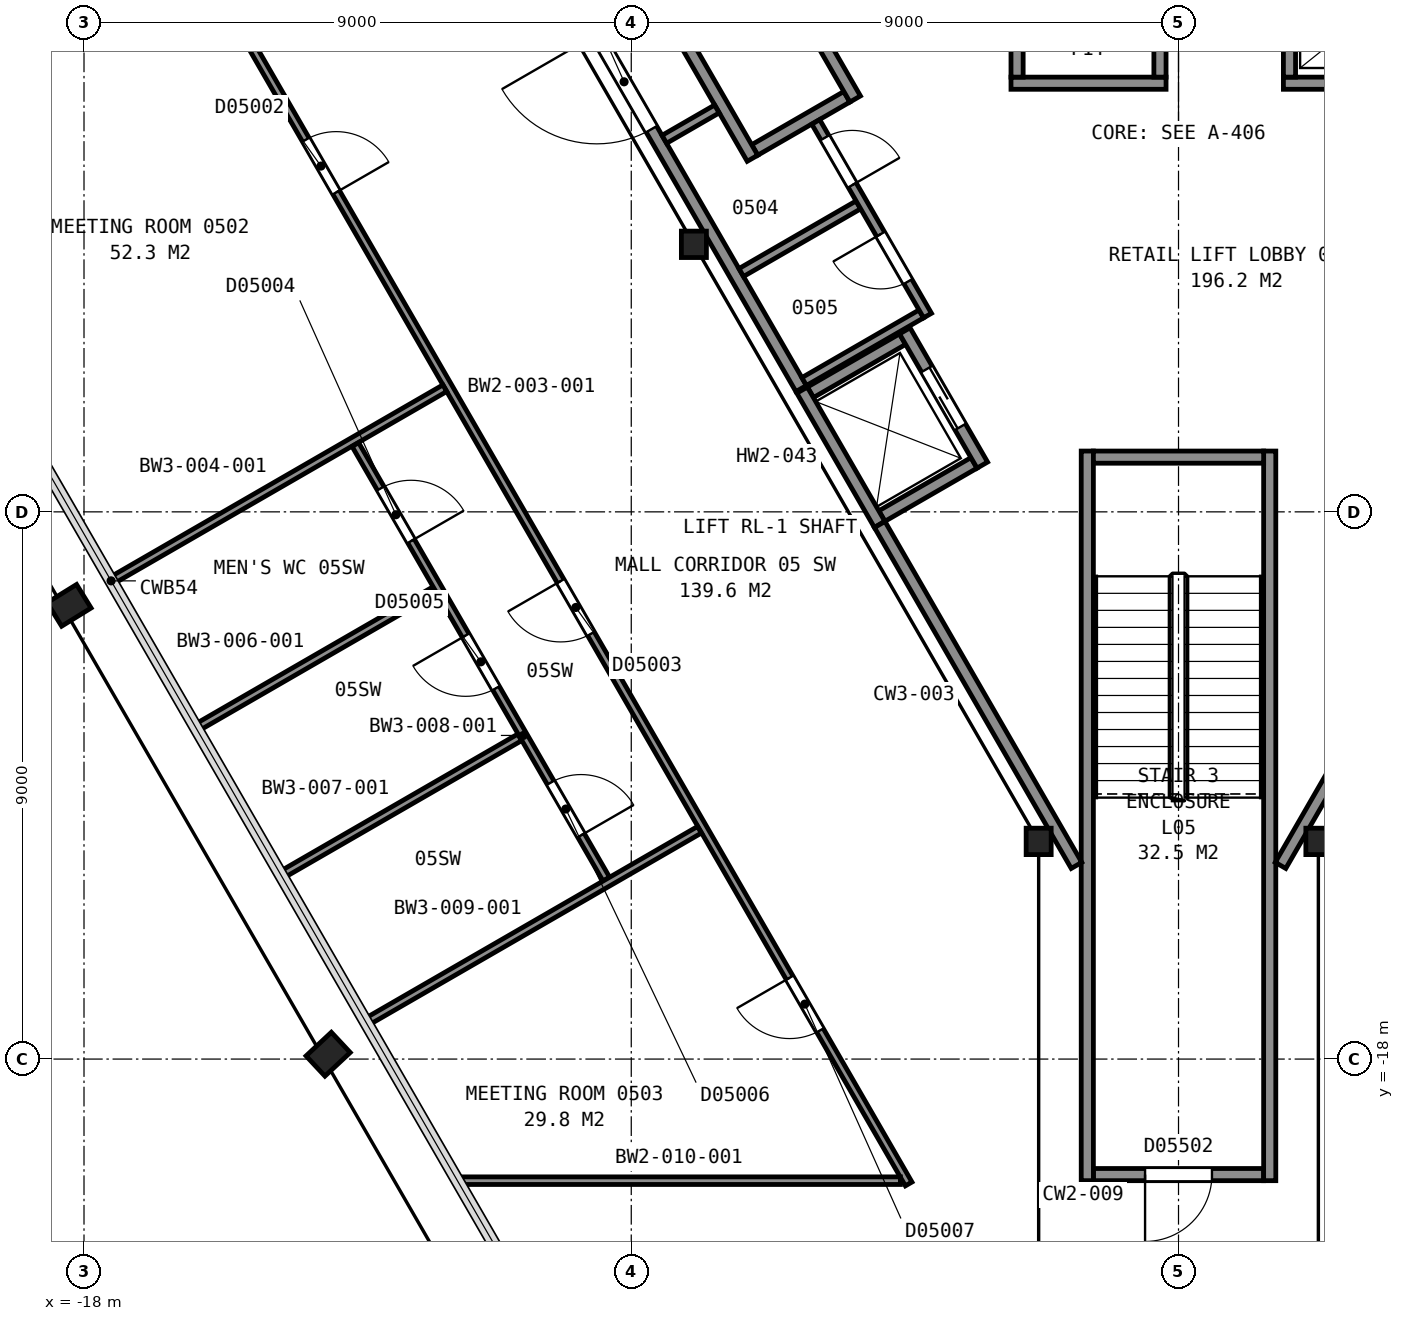
"""IFC4 building model, lengths in metres.
Left out: names, types, materials, properties, quantities, classifications, styles, units other than length and angle.
Written with IfcOpenShell. Run it as: python <this file> out.ifc"""

import sys

from ifc_helpers import new_model, si_unit, direction, frame, frame_2d, origin, origin_2d, place, context, subcontext, project, spatial, rectangle, i_section, extrude, element, fill, save


model = new_model("IFC4")
c1 = context("Model", 3, precision=1e-05, world=origin(), true_north=direction((0.0, 1.0)))
c2 = subcontext(c1, "Body", "Model", "MODEL_VIEW")
j1 = project(units=[si_unit("LENGTHUNIT", "METRE"), si_unit("PLANEANGLEUNIT", "RADIAN")], contexts=[c1])
p1 = place(None, origin())
s1 = spatial("IfcSite", under=j1, at=p1, CompositionType="ELEMENT")
p2 = place(p1, origin())
s2 = spatial("IfcBuilding", under=s1, at=p2, CompositionType="ELEMENT")
p3 = place(p2, frame((0.0, 0.0, 32.0)))
s3 = spatial("IfcBuildingStorey", under=s2, at=p3, CompositionType="ELEMENT", Elevation=32.0)
p4 = place(p3, frame((-18.328, -10.589, 0.025), z_axis=(0.070582350376, 0.043588955131, 0.996553126936), x_axis=(-0.499945117104, 0.866053561357, -0.002471587651)))
e1 = element("IfcColumn", 1, at=p4, inside=s3, PredefinedType="COLUMN", context=c2, shape_type="SweptSolid", body=[
    extrude(i_section(OverallWidth=0.455, OverallDepth=0.569, WebThickness=0.078, FlangeThickness=0.125, FilletRadius=0.015, at=origin_2d()), origin(), (0.0, 0.0, 1.0), 4.766),
])
p5 = place(p3, frame((-14.058, -17.989, 0.025), z_axis=(0.062221812166, 0.058124902723, 0.996368376543), x_axis=(-0.500286642151, 0.865645685463, -0.019256763096)))
e2 = element("IfcColumn", 2, at=p5, inside=s3, PredefinedType="COLUMN", context=c2, shape_type="SweptSolid", body=[
    extrude(i_section(OverallWidth=0.455, OverallDepth=0.569, WebThickness=0.078, FlangeThickness=0.125, FilletRadius=0.015, at=origin_2d()), origin(), (0.0, 0.0, 1.0), 4.767),
])
for number, where, z_axis, x_axis in (
    (3, (-7.97, -4.6, 0.0), (0.0, 0.0, 1.0), (1.0, 0.0, 0.0)),
    (4, (-2.3, -14.42, 0.0), (0.0, 0.0, 1.0), (1.0, 0.0, 0.0)),
    (5, (2.3, -14.42, 0.0), (0.0, 0.0, 1.0), (1.0, 0.0, 0.0)),
):
    element("IfcColumn", number, at=place(p3, frame(where, z_axis=z_axis, x_axis=x_axis)), inside=s3, PredefinedType="COLUMN", context=c2, shape_type="SweptSolid", body=[
        extrude(i_section(OverallWidth=0.411, OverallDepth=0.434, WebThickness=0.036, FlangeThickness=0.057, FilletRadius=0.015, at=origin_2d()), origin(), (0.0, 0.0, 1.0), 4.8),
    ])
p6 = place(p3, frame((-1.4, -19.9, 0.0), z_axis=(0.0, 0.0, 1.0), x_axis=(1.0, 0.0, 0.0)))
e6 = element("IfcWall", 6, at=p6, inside=s3, PredefinedType="PARTITIONING", context=c2, shape_type="SweptSolid", body=[
    extrude(rectangle(XDim=2.8, YDim=0.2, at=frame_2d((1.4, 0.0))), origin(), (0.0, 0.0, 1.0), 4.55),
])
p7 = place(p6, frame((0.85, 0.0, 0.0)))
e7 = element("IfcOpeningElement", 7, at=p7, cuts=e6, PredefinedType="OPENING", context=c2, shape_type="SweptSolid", body=[
    extrude(rectangle(XDim=1.1, YDim=2.1, at=frame_2d((0.55, 1.05))), frame((0.0, 0.11, 0.0), z_axis=(0.0, -1.0, 0.0), x_axis=(1.0, 0.0, 0.0)), (0.0, 0.0, 1.0), 0.22),
])
for number, where, z_axis, x_axis in (
    (8, (1.5, -8.0, 0.0), (0.0, 0.0, 1.0), (0.0, -1.0, 0.0)),
    (9, (-1.5, -8.0, 0.0), (0.0, 0.0, 1.0), (0.0, -1.0, 0.0)),
):
    element("IfcWall", number, at=place(p3, frame(where, z_axis=z_axis, x_axis=x_axis)), inside=s3, PredefinedType="PARTITIONING", context=c2, shape_type="SweptSolid", body=[
        extrude(rectangle(XDim=12.0, YDim=0.2, at=frame_2d((6.0, 0.0))), origin(), (0.0, 0.0, 1.0), 4.55),
    ])
p8 = place(p3, frame((-1.4, -8.1, 0.0), z_axis=(0.0, 0.0, 1.0), x_axis=(1.0, 0.0, 0.0)))
e10 = element("IfcWall", 10, at=p8, inside=s3, PredefinedType="PARTITIONING", context=c2, shape_type="SweptSolid", body=[
    extrude(rectangle(XDim=2.8, YDim=0.2, at=frame_2d((1.4, 0.0))), origin(), (0.0, 0.0, 1.0), 4.55),
])
p9 = place(p3, frame((-2.755, -1.95, 0.0), z_axis=(0.0, 0.0, 1.0), x_axis=(1.0, 0.0, 0.0)))
e11 = element("IfcWall", 11, at=p9, inside=s3, PredefinedType="PARTITIONING", context=c2, shape_type="SweptSolid", body=[
    extrude(rectangle(XDim=2.55, YDim=0.2, at=frame_2d((1.275, 0.0))), origin(), (0.0, 0.0, 1.0), 4.8),
])
p10 = place(p3, frame((1.725, -1.95, 0.0), z_axis=(0.0, 0.0, 1.0), x_axis=(1.0, 0.0, 0.0)))
e12 = element("IfcWall", 12, at=p10, inside=s3, PredefinedType="PARTITIONING", context=c2, shape_type="SweptSolid", body=[
    extrude(rectangle(XDim=2.55, YDim=0.2, at=frame_2d((1.275, 0.0))), origin(), (0.0, 0.0, 1.0), 4.55),
])
p11 = place(p10, frame((0.725, 0.0, 0.0)))
e13 = element("IfcOpeningElement", 13, at=p11, cuts=e12, PredefinedType="OPENING", context=c2, shape_type="SweptSolid", body=[
    extrude(rectangle(XDim=1.1, YDim=2.1, at=frame_2d((0.55, 1.05))), frame((0.0, 0.11, 0.0), z_axis=(0.0, -1.0, 0.0), x_axis=(1.0, 0.0, 0.0)), (0.0, 0.0, 1.0), 0.22),
])
for number, where, z_axis, x_axis in (
    (14, (-4.879, -9.07, 0.0), (0.0, 0.0, 1.0), (0.866, 0.5, 0.0)),
    (15, (-6.054, -7.034, 0.0), (0.0, 0.0, 1.0), (0.866, 0.5, 0.0)),
):
    element("IfcWall", number, at=place(p3, frame(where, z_axis=z_axis, x_axis=x_axis)), inside=s3, PredefinedType="PARTITIONING", context=c2, shape_type="SweptSolid", body=[
        extrude(rectangle(XDim=1.75, YDim=0.2, at=frame_2d((0.875, 0.0))), origin(), (0.0, 0.0, 1.0), 4.55),
    ])
p12 = place(p3, frame((-6.97, -3.048, 0.0), z_axis=(0.0, 0.0, 1.0), x_axis=(0.866036909293, 0.499980071345, 0.0)))
e16 = element("IfcWall", 16, at=p12, inside=s3, PredefinedType="PARTITIONING", context=c2, shape_type="SweptSolid", body=[
    extrude(rectangle(XDim=1.75, YDim=0.2, at=frame_2d((0.875, 0.0))), origin(), (0.0, 0.0, 1.0), 4.8),
])
p13 = place(p3, frame((1.825, -1.85, 0.0), z_axis=(0.0, 0.0, 1.0), x_axis=(0.0, 1.0, 0.0)))
e17 = element("IfcWall", 17, at=p13, inside=s3, PredefinedType="PARTITIONING", context=c2, shape_type="SweptSolid", body=[
    extrude(rectangle(XDim=1.75, YDim=0.2, at=frame_2d((0.875, 0.0))), origin(), (0.0, 0.0, 1.0), 4.55),
])
for number, where, z_axis, x_axis in (
    (18, (-0.305, -1.85, 0.0), (0.0, 0.0, 1.0), (0.0, 1.0, 0.0)),
    (19, (-2.655, -1.85, 0.0), (0.0, 0.0, 1.0), (0.0, 1.0, 0.0)),
):
    element("IfcWall", number, at=place(p3, frame(where, z_axis=z_axis, x_axis=x_axis)), inside=s3, PredefinedType="PARTITIONING", context=c2, shape_type="SweptSolid", body=[
        extrude(rectangle(XDim=1.75, YDim=0.2, at=frame_2d((0.875, 0.0))), origin(), (0.0, 0.0, 1.0), 4.8),
    ])
p14 = place(p3, frame((-5.318, -2.21, 0.0), z_axis=(0.0, 0.0, 1.0), x_axis=(-0.499938297808, 0.866061024631, 0.0)))
e20 = element("IfcWall", 20, at=p14, inside=s3, PredefinedType="PARTITIONING", context=c2, shape_type="SweptSolid", body=[
    extrude(rectangle(XDim=2.35, YDim=0.2, at=frame_2d((1.175, 0.0))), origin(), (0.0, 0.0, 1.0), 4.8),
])
p15 = place(p3, frame((-3.227, -8.231, 0.0), z_axis=(0.0, 0.0, 1.0), x_axis=(-0.499948979701, 0.866054858364, 0.0)))
e21 = element("IfcWall", 21, at=p15, inside=s3, PredefinedType="PARTITIONING", context=c2, shape_type="SweptSolid", body=[
    extrude(rectangle(XDim=2.55, YDim=0.2, at=frame_2d((1.275, 0.0))), origin(), (0.0, 0.0, 1.0), 4.55),
])
p16 = place(p15, frame((0.725, 0.0, 0.0)))
e22 = element("IfcOpeningElement", 22, at=p16, cuts=e21, PredefinedType="OPENING", context=c2, shape_type="SweptSolid", body=[
    extrude(rectangle(XDim=1.1, YDim=2.1, at=frame_2d((0.55, 1.05))), frame((0.0, 0.11, 0.0), z_axis=(0.0, -1.0, 0.0), x_axis=(1.0, 0.0, 0.0)), (0.0, 0.0, 1.0), 0.22),
])
p17 = place(p3, frame((-7.006, -3.185, 0.0), z_axis=(0.0, 0.0, 1.0), x_axis=(-0.499990435942, 0.866030925526, 0.0)))
e23 = element("IfcWall", 23, at=p17, inside=s3, PredefinedType="PARTITIONING", context=c2, shape_type="SweptSolid", body=[
    extrude(rectangle(XDim=2.55, YDim=0.2, at=frame_2d((1.275, 0.0))), origin(), (0.0, 0.0, 1.0), 4.8),
])
p18 = place(p3, frame((-4.916, -9.206, 0.0), z_axis=(0.0, 0.0, 1.0), x_axis=(-0.499990435942, 0.866030925526, 0.0)))
e24 = element("IfcWall", 24, at=p18, inside=s3, PredefinedType="PARTITIONING", context=c2, shape_type="SweptSolid", body=[
    extrude(rectangle(XDim=2.55, YDim=0.2, at=frame_2d((1.275, 0.0))), origin(), (0.0, 0.0, 1.0), 4.55),
])
p19 = place(p3, frame((-13.666, 5.95, 0.0), z_axis=(0.0, 0.0, 1.0), x_axis=(0.499985890914, -0.866033549516, 0.0)))
e25 = element("IfcWall", 25, at=p19, inside=s3, PredefinedType="PARTITIONING", context=c2, shape_type="SweptSolid", body=[
    extrude(rectangle(XDim=14.921, YDim=0.2, at=frame_2d((7.461, 0.0))), origin(), (0.0, 0.0, 1.0), 4.55),
])
p20 = place(p19, frame((8.196, 0.0, 0.0)))
e26 = element("IfcOpeningElement", 26, at=p20, cuts=e25, PredefinedType="OPENING", context=c2, shape_type="SweptSolid", body=[
    extrude(rectangle(XDim=1.8, YDim=2.1, at=frame_2d((0.9, 1.05))), frame((0.0, 0.11, 0.0), z_axis=(0.0, -1.0, 0.0), x_axis=(1.0, 0.0, 0.0)), (0.0, 0.0, 1.0), 0.22),
])
p21 = place(p3, frame((-8.456, -2.873, 0.0), z_axis=(0.0, 0.0, 1.0), x_axis=(0.866006330792, 0.500033033937, 0.0)))
e27 = element("IfcWall", 27, at=p21, inside=s3, PredefinedType="PARTITIONING", context=c2, shape_type="SweptSolid", body=[
    extrude(rectangle(XDim=0.998, YDim=0.15, at=frame_2d((0.499, 0.0))), origin(), (0.0, 0.0, 1.0), 4.55),
])
for number, where, z_axis, x_axis in (
    (28, (-7.191, -5.064, 0.0), (0.0, 0.0, 1.0), (0.866, 0.5, 0.0)),
    (29, (-6.156, -6.857, 0.0), (0.0, 0.0, 1.0), (0.866, 0.5, 0.0)),
):
    element("IfcWall", number, at=place(p3, frame(where, z_axis=z_axis, x_axis=x_axis)), inside=s3, PredefinedType="PARTITIONING", context=c2, shape_type="SweptSolid", body=[
        extrude(rectangle(XDim=2.225, YDim=0.15, at=frame_2d((1.112, 0.0))), origin(), (0.0, 0.0, 1.0), 4.55),
    ])
p22 = place(p3, frame((-4.127, -5.772, 0.0), z_axis=(0.0, 0.0, 1.0), x_axis=(-0.499944653301, 0.866057355858, 0.0)))
e30 = element("IfcWall", 30, at=p22, inside=s3, PredefinedType="PARTITIONING", context=c2, shape_type="SweptSolid", body=[
    extrude(rectangle(XDim=3.678, YDim=0.15, at=frame_2d((1.839, 0.0))), origin(), (0.0, 0.0, 1.0), 4.55),
])
p23 = place(p22, frame((2.478, 0.0, 0.0)))
e31 = element("IfcOpeningElement", 31, at=p23, cuts=e30, PredefinedType="OPENING", context=c2, shape_type="SweptSolid", body=[
    extrude(rectangle(XDim=0.9, YDim=2.1, at=frame_2d((0.45, 1.05))), frame((0.0, 0.085, 0.0), z_axis=(0.0, -1.0, 0.0), x_axis=(1.0, 0.0, 0.0)), (0.0, 0.0, 1.0), 0.17),
])
p24 = place(p22, frame((0.646, 0.0, 0.0)))
e32 = element("IfcOpeningElement", 32, at=p24, cuts=e30, PredefinedType="OPENING", context=c2, shape_type="SweptSolid", body=[
    extrude(rectangle(XDim=0.9, YDim=2.1, at=frame_2d((0.45, 1.05))), frame((0.0, 0.085, 0.0), z_axis=(0.0, -1.0, 0.0), x_axis=(1.0, 0.0, 0.0)), (0.0, 0.0, 1.0), 0.17),
])
p25 = place(p3, frame((-4.914, -9.208, 0.0), z_axis=(0.0, 0.0, 1.0), x_axis=(0.499947703927, -0.866055594831, 0.0)))
e33 = element("IfcWall", 33, at=p25, inside=s3, PredefinedType="PARTITIONING", context=c2, shape_type="SweptSolid", body=[
    extrude(rectangle(XDim=6.474, YDim=0.2, at=frame_2d((3.237, 0.0))), origin(), (0.0, 0.0, 1.0), 4.55),
])
p26 = place(p3, frame((1.677, -14.815, 0.0), z_axis=(0.0, 0.0, 1.0), x_axis=(0.49999445743, 0.866028603765, 0.0)))
e34 = element("IfcWall", 34, at=p26, inside=s3, PredefinedType="PARTITIONING", context=c2, shape_type="SweptSolid", body=[
    extrude(rectangle(XDim=5.905, YDim=0.2, at=frame_2d((2.952, 0.0))), origin(), (0.0, 0.0, 1.0), 4.55),
])
p27 = place(p3, frame((-21.746, -2.875, 0.0), z_axis=(0.0, 0.0, 1.0), x_axis=(0.866118237319, 0.499839173118, 0.0)))
e35 = element("IfcWall", 35, at=p27, inside=s3, PredefinedType="PARTITIONING", context=c2, shape_type="SweptSolid", body=[
    extrude(rectangle(XDim=6.337, YDim=0.125, at=frame_2d((3.169, 0.0))), origin(), (0.0, 0.0, 1.0), 3.793),
])
p28 = place(p3, frame((-4.438, -20.054, 0.0), z_axis=(0.0, 0.0, 1.0), x_axis=(-0.499994028088, 0.866028851642, 0.0)))
e36 = element("IfcWall", 36, at=p28, inside=s3, PredefinedType="PARTITIONING", context=c2, shape_type="SweptSolid", body=[
    extrude(rectangle(XDim=30.297, YDim=0.125, at=frame_2d((15.148, 0.0))), origin(), (0.0, 0.0, 1.0), 3.793),
])
p29 = place(p28, frame((26.385, 0.0, 0.0)))
e37 = element("IfcOpeningElement", 37, at=p29, cuts=e36, PredefinedType="OPENING", context=c2, shape_type="SweptSolid", body=[
    extrude(rectangle(XDim=1.0, YDim=2.1, at=frame_2d((0.5, 1.05))), frame((0.0, 0.073, 0.0), z_axis=(0.0, -1.0, 0.0), x_axis=(1.0, 0.0, 0.0)), (0.0, 0.0, 1.0), 0.145),
])
p30 = place(p28, frame((18.831, 0.0, 0.0)))
e38 = element("IfcOpeningElement", 38, at=p30, cuts=e36, PredefinedType="OPENING", context=c2, shape_type="SweptSolid", body=[
    extrude(rectangle(XDim=1.0, YDim=2.1, at=frame_2d((0.5, 1.05))), frame((0.0, 0.073, 0.0), z_axis=(0.0, -1.0, 0.0), x_axis=(1.0, 0.0, 0.0)), (0.0, 0.0, 1.0), 0.145),
])
p31 = place(p28, frame((10.449, 0.0, 0.0)))
e39 = element("IfcOpeningElement", 39, at=p31, cuts=e36, PredefinedType="OPENING", context=c2, shape_type="SweptSolid", body=[
    extrude(rectangle(XDim=1.0, YDim=2.1, at=frame_2d((0.5, 1.05))), frame((0.0, 0.073, 0.0), z_axis=(0.0, -1.0, 0.0), x_axis=(1.0, 0.0, 0.0)), (0.0, 0.0, 1.0), 0.145),
])
p32 = place(p28, frame((2.916, 0.0, 0.0)))
e40 = element("IfcOpeningElement", 40, at=p32, cuts=e36, PredefinedType="OPENING", context=c2, shape_type="SweptSolid", body=[
    extrude(rectangle(XDim=1.0, YDim=2.1, at=frame_2d((0.5, 1.05))), frame((0.0, 0.073, 0.0), z_axis=(0.0, -1.0, 0.0), x_axis=(1.0, 0.0, 0.0)), (0.0, 0.0, 1.0), 0.145),
])
p33 = place(p3, frame((-17.554, -10.135, 0.0), z_axis=(0.0, 0.0, 1.0), x_axis=(0.866003371142, 0.500038159714, 0.0)))
e41 = element("IfcWall", 41, at=p33, inside=s3, PredefinedType="PARTITIONING", context=c2, shape_type="SweptSolid", body=[
    extrude(rectangle(XDim=6.337, YDim=0.125, at=frame_2d((3.168, 0.0))), origin(), (0.0, 0.0, 1.0), 3.793),
])
p34 = place(p3, frame((-16.157, -12.555, 0.0), z_axis=(0.0, 0.0, 1.0), x_axis=(0.866009042838, 0.50002833692, 0.0)))
e42 = element("IfcWall", 42, at=p34, inside=s3, PredefinedType="PARTITIONING", context=c2, shape_type="SweptSolid", body=[
    extrude(rectangle(XDim=4.537, YDim=0.125, at=frame_2d((2.269, 0.0))), origin(), (0.0, 0.0, 1.0), 4.64),
])
p35 = place(p3, frame((-14.76, -14.975, 0.0), z_axis=(0.0, 0.0, 1.0), x_axis=(0.866030417568, 0.499991315771, 0.0)))
e43 = element("IfcWall", 43, at=p35, inside=s3, PredefinedType="PARTITIONING", context=c2, shape_type="SweptSolid", body=[
    extrude(rectangle(XDim=4.533, YDim=0.125, at=frame_2d((2.266, 0.0))), origin(), (0.0, 0.0, 1.0), 4.64),
])
p36 = place(p3, frame((-9.41, -15.041, 0.0), z_axis=(0.0, 0.0, 1.0), x_axis=(-0.500068128175, 0.865986066391, 0.0)))
e44 = element("IfcWall", 44, at=p36, inside=s3, PredefinedType="PARTITIONING", context=c2, shape_type="SweptSolid", body=[
    extrude(rectangle(XDim=8.253, YDim=0.125, at=frame_2d((4.126, 0.0))), origin(), (0.0, 0.0, 1.0), 4.64),
])
p37 = place(p36, frame((6.421, 0.0, 0.0)))
e45 = element("IfcOpeningElement", 45, at=p37, cuts=e44, PredefinedType="OPENING", context=c2, shape_type="SweptSolid", body=[
    extrude(rectangle(XDim=1.0, YDim=2.1, at=frame_2d((0.5, 1.05))), frame((0.0, 0.073, 0.0), z_axis=(0.0, -1.0, 0.0), x_axis=(1.0, 0.0, 0.0)), (0.0, 0.0, 1.0), 0.145),
])
p38 = place(p36, frame((3.627, 0.0, 0.0)))
e46 = element("IfcOpeningElement", 46, at=p38, cuts=e44, PredefinedType="OPENING", context=c2, shape_type="SweptSolid", body=[
    extrude(rectangle(XDim=1.0, YDim=2.1, at=frame_2d((0.5, 1.05))), frame((0.0, 0.073, 0.0), z_axis=(0.0, -1.0, 0.0), x_axis=(1.0, 0.0, 0.0)), (0.0, 0.0, 1.0), 0.145),
])
p39 = place(p36, frame((0.832, 0.0, 0.0)))
e47 = element("IfcOpeningElement", 47, at=p39, cuts=e44, PredefinedType="OPENING", context=c2, shape_type="SweptSolid", body=[
    extrude(rectangle(XDim=1.0, YDim=2.1, at=frame_2d((0.5, 1.05))), frame((0.0, 0.073, 0.0), z_axis=(0.0, -1.0, 0.0), x_axis=(1.0, 0.0, 0.0)), (0.0, 0.0, 1.0), 0.145),
])
p40 = place(p3, frame((-13.363, -17.395, 0.0), z_axis=(0.0, 0.0, 1.0), x_axis=(0.866044997331, 0.499966061446, 0.0)))
e48 = element("IfcWall", 48, at=p40, inside=s3, PredefinedType="PARTITIONING", context=c2, shape_type="SweptSolid", body=[
    extrude(rectangle(XDim=6.333, YDim=0.125, at=frame_2d((3.167, 0.0))), origin(), (0.0, 0.0, 1.0), 3.793),
])
p41 = place(p3, frame((-11.859, -20.0, 0.0), z_axis=(0.0, 0.0, 1.0), x_axis=(1.0, 0.0, 0.0)))
e49 = element("IfcWall", 49, at=p41, inside=s3, PredefinedType="PARTITIONING", context=c2, shape_type="SweptSolid", body=[
    extrude(rectangle(XDim=7.285, YDim=0.125, at=frame_2d((3.643, 0.0))), origin(), (0.0, 0.0, 1.0), 4.64),
])
p42 = place(p7, origin())
e50 = element("IfcDoor", 50, at=p42, inside=s3, OperationType="SINGLE_SWING_LEFT", PredefinedType="DOOR", context=c2, shape_type="SweptSolid", body=[
    extrude(rectangle(XDim=1.1, YDim=2.1, at=frame_2d((0.55, 1.05))), frame((0.0, 0.025, 0.0), z_axis=(0.0, -1.0, 0.0), x_axis=(1.0, 0.0, 0.0)), (0.0, 0.0, 1.0), 0.05),
])
fill(e7, e50)
p43 = place(p16, origin())
e51 = element("IfcDoor", 51, at=p43, inside=s3, OperationType="SLIDING_TO_LEFT", PredefinedType="DOOR", context=c2, shape_type="SweptSolid", body=[
    extrude(rectangle(XDim=1.1, YDim=2.1, at=frame_2d((0.55, 1.05))), frame((0.0, 0.025, 0.0), z_axis=(0.0, -1.0, 0.0), x_axis=(1.0, 0.0, 0.0)), (0.0, 0.0, 1.0), 0.05),
])
fill(e22, e51)
p44 = place(p20, origin())
e52 = element("IfcDoor", 52, at=p44, inside=s3, OperationType="DOUBLE_DOOR_SINGLE_SWING", PredefinedType="DOOR", context=c2, shape_type="SweptSolid", body=[
    extrude(rectangle(XDim=1.8, YDim=2.1, at=frame_2d((0.9, 1.05))), frame((0.0, 0.025, 0.0), z_axis=(0.0, -1.0, 0.0), x_axis=(1.0, 0.0, 0.0)), (0.0, 0.0, 1.0), 0.05),
])
fill(e26, e52)
p45 = place(p23, origin())
e53 = element("IfcDoor", 53, at=p45, inside=s3, OperationType="SINGLE_SWING_LEFT", PredefinedType="DOOR", context=c2, shape_type="SweptSolid", body=[
    extrude(rectangle(XDim=0.9, YDim=2.1, at=frame_2d((0.45, 1.05))), frame((0.0, 0.025, 0.0), z_axis=(0.0, -1.0, 0.0), x_axis=(1.0, 0.0, 0.0)), (0.0, 0.0, 1.0), 0.05),
])
fill(e31, e53)
p46 = place(p24, origin())
e54 = element("IfcDoor", 54, at=p46, inside=s3, OperationType="SINGLE_SWING_RIGHT", PredefinedType="DOOR", context=c2, shape_type="SweptSolid", body=[
    extrude(rectangle(XDim=0.9, YDim=2.1, at=frame_2d((0.45, 1.05))), frame((0.0, 0.025, 0.0), z_axis=(0.0, -1.0, 0.0), x_axis=(1.0, 0.0, 0.0)), (0.0, 0.0, 1.0), 0.05),
])
fill(e32, e54)
p47 = place(p30, origin())
e55 = element("IfcDoor", 55, at=p47, inside=s3, OperationType="SINGLE_SWING_LEFT", PredefinedType="DOOR", context=c2, shape_type="SweptSolid", body=[
    extrude(rectangle(XDim=1.0, YDim=2.1, at=frame_2d((0.5, 1.05))), frame((0.0, 0.025, 0.0), z_axis=(0.0, -1.0, 0.0), x_axis=(1.0, 0.0, 0.0)), (0.0, 0.0, 1.0), 0.05),
])
fill(e38, e55)
p48 = place(p31, origin())
e56 = element("IfcDoor", 56, at=p48, inside=s3, OperationType="SINGLE_SWING_RIGHT", PredefinedType="DOOR", context=c2, shape_type="SweptSolid", body=[
    extrude(rectangle(XDim=1.0, YDim=2.1, at=frame_2d((0.5, 1.05))), frame((0.0, 0.025, 0.0), z_axis=(0.0, -1.0, 0.0), x_axis=(1.0, 0.0, 0.0)), (0.0, 0.0, 1.0), 0.05),
])
fill(e39, e56)
p49 = place(p32, origin())
e57 = element("IfcDoor", 57, at=p49, inside=s3, OperationType="SINGLE_SWING_RIGHT", PredefinedType="DOOR", context=c2, shape_type="SweptSolid", body=[
    extrude(rectangle(XDim=1.0, YDim=2.1, at=frame_2d((0.5, 1.05))), frame((0.0, 0.025, 0.0), z_axis=(0.0, -1.0, 0.0), x_axis=(1.0, 0.0, 0.0)), (0.0, 0.0, 1.0), 0.05),
])
fill(e40, e57)
p50 = place(p37, origin())
e58 = element("IfcDoor", 58, at=p50, inside=s3, OperationType="SINGLE_SWING_LEFT", PredefinedType="DOOR", context=c2, shape_type="SweptSolid", body=[
    extrude(rectangle(XDim=1.0, YDim=2.1, at=frame_2d((0.5, 1.05))), frame((0.0, 0.025, 0.0), z_axis=(0.0, -1.0, 0.0), x_axis=(1.0, 0.0, 0.0)), (0.0, 0.0, 1.0), 0.05),
])
fill(e45, e58)
p51 = place(p38, origin())
e59 = element("IfcDoor", 59, at=p51, inside=s3, OperationType="SINGLE_SWING_RIGHT", PredefinedType="DOOR", context=c2, shape_type="SweptSolid", body=[
    extrude(rectangle(XDim=1.0, YDim=2.1, at=frame_2d((0.5, 1.05))), frame((0.0, 0.025, 0.0), z_axis=(0.0, -1.0, 0.0), x_axis=(1.0, 0.0, 0.0)), (0.0, 0.0, 1.0), 0.05),
])
fill(e46, e59)
p52 = place(p39, origin())
e60 = element("IfcDoor", 60, at=p52, inside=s3, OperationType="SINGLE_SWING_LEFT", PredefinedType="DOOR", context=c2, shape_type="SweptSolid", body=[
    extrude(rectangle(XDim=1.0, YDim=2.1, at=frame_2d((0.5, 1.05))), frame((0.0, 0.025, 0.0), z_axis=(0.0, -1.0, 0.0), x_axis=(1.0, 0.0, 0.0)), (0.0, 0.0, 1.0), 0.05),
])
fill(e47, e60)
save(model, sys.argv[1])
